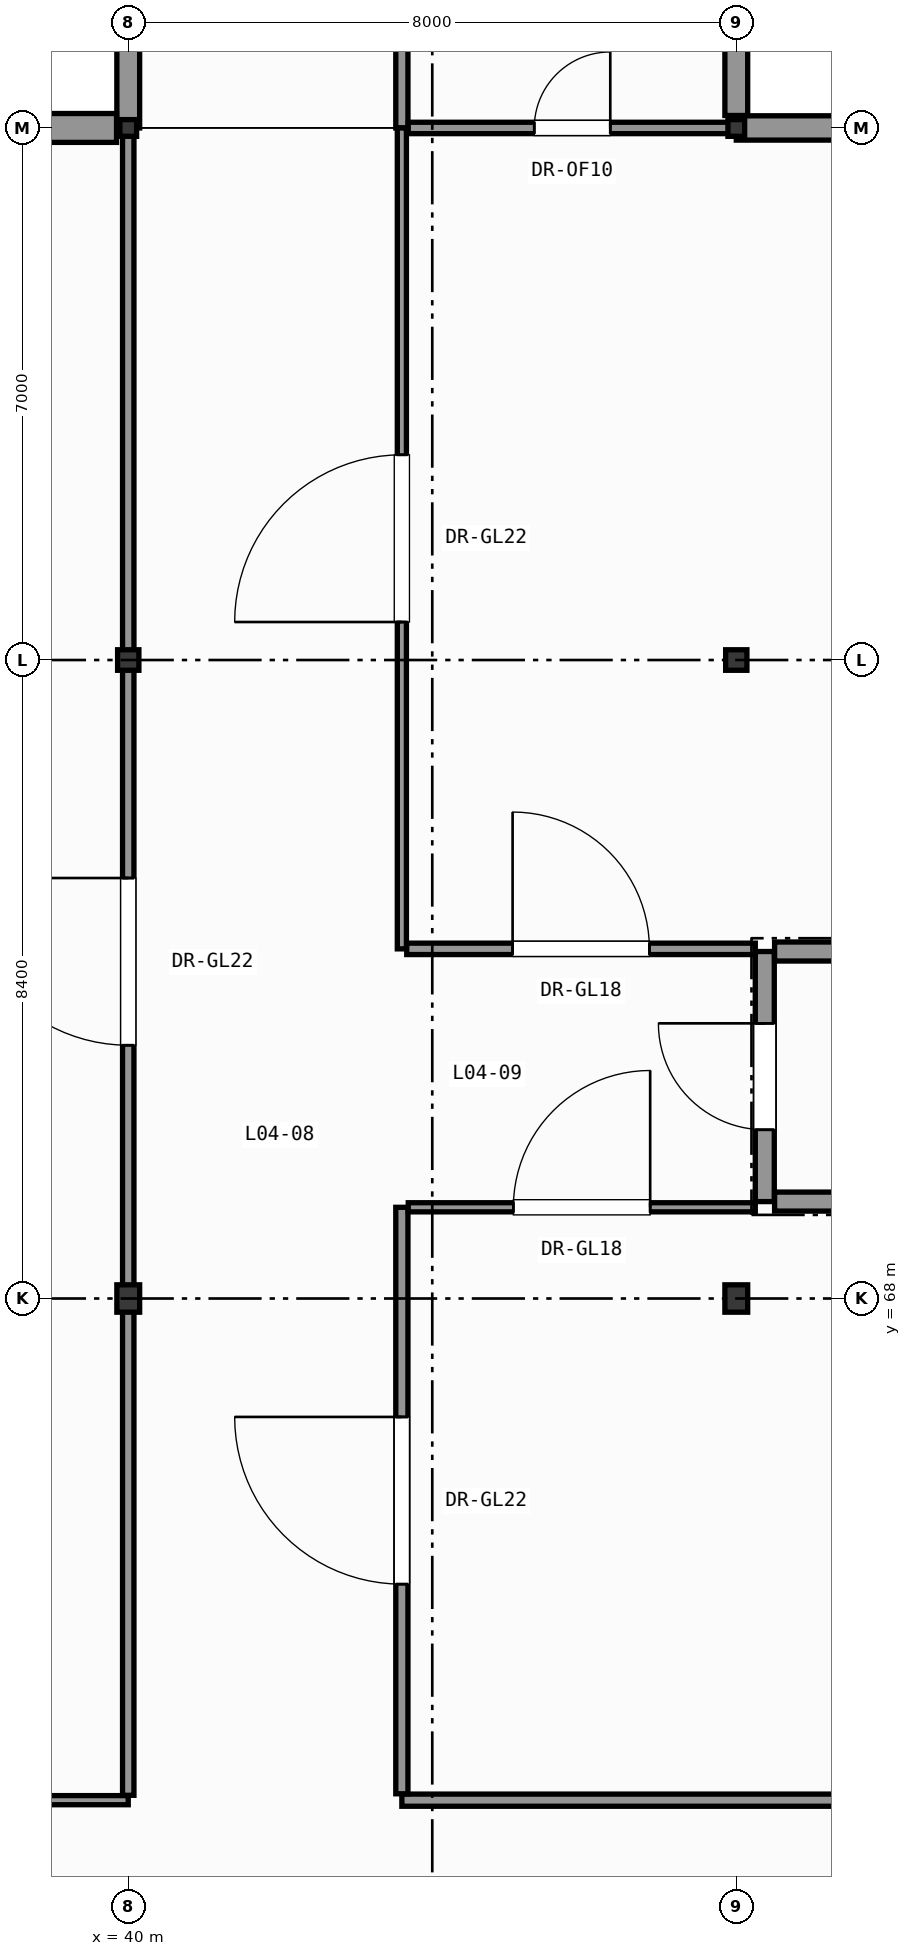
"""IFC4 building model, lengths in metres.
Left out: names, types, materials, properties, quantities, classifications, styles, units other than length and angle.
Written with IfcOpenShell. Run it as: python <this file> out.ifc"""

import sys

from ifc_helpers import new_model, si_unit, direction, frame, frame_2d, origin, origin_2d, place, context, subcontext, project, spatial, rectangle, hollow_rectangle, i_section, extrude, element, fill, save


model = new_model("IFC4")
c1 = context("Model", 3, precision=1e-05, world=origin(), true_north=direction((0.0, 1.0)))
c2 = subcontext(c1, "Body", "Model", "MODEL_VIEW")
j1 = project(units=[si_unit("LENGTHUNIT", "METRE"), si_unit("PLANEANGLEUNIT", "RADIAN")], contexts=[c1])
p1 = place(None, origin())
s1 = spatial("IfcSite", under=j1, at=p1, CompositionType="ELEMENT")
p2 = place(p1, origin())
s2 = spatial("IfcBuilding", under=s1, at=p2, CompositionType="ELEMENT")
p3 = place(p2, frame((0.0, 0.0, 18.0)))
s3 = spatial("IfcBuildingStorey", under=s2, at=p3, CompositionType="ELEMENT", Elevation=18.0)
p4 = place(p3, frame((40.0, 68.0, 0.0), z_axis=(0.0, 0.0, 1.0), x_axis=(1.0, 0.0, 0.0)))
e1 = element("IfcColumn", 1, at=p4, inside=s3, PredefinedType="COLUMN", context=c2, shape_type="SweptSolid", body=[
    extrude(i_section(OverallWidth=0.3, OverallDepth=0.36, WebThickness=0.012, FlangeThickness=0.022, FilletRadius=0.027, at=origin_2d()), origin(), (0.0, 0.0, 1.0), 4.2),
])
p5 = place(p3, frame((40.0, 76.4, 0.0), z_axis=(0.0, 0.0, 1.0), x_axis=(1.0, 0.0, 0.0)))
e2 = element("IfcColumn", 2, at=p5, inside=s3, PredefinedType="COLUMN", context=c2, shape_type="SweptSolid", body=[
    extrude(i_section(OverallWidth=0.28, OverallDepth=0.27, WebThickness=0.008, FlangeThickness=0.013, FilletRadius=0.024, at=origin_2d()), origin(), (0.0, 0.0, 1.0), 4.2),
])
p6 = place(p3, frame((40.0, 83.4, 0.0), z_axis=(0.0, 0.0, 1.0), x_axis=(1.0, 0.0, 0.0)))
e3 = element("IfcColumn", 3, at=p6, inside=s3, PredefinedType="COLUMN", context=c2, shape_type="SweptSolid", body=[
    extrude(hollow_rectangle(XDim=0.22, YDim=0.22, WallThickness=0.012, InnerFilletRadius=0.012, OuterFilletRadius=0.024, at=origin_2d()), origin(), (0.0, 0.0, 1.0), 4.2),
])
p7 = place(p3, frame((48.0, 68.0, 0.0), z_axis=(0.0, 0.0, 1.0), x_axis=(1.0, 0.0, 0.0)))
e4 = element("IfcColumn", 4, at=p7, inside=s3, PredefinedType="COLUMN", context=c2, shape_type="SweptSolid", body=[
    extrude(i_section(OverallWidth=0.3, OverallDepth=0.36, WebThickness=0.012, FlangeThickness=0.022, FilletRadius=0.027, at=origin_2d()), origin(), (0.0, 0.0, 1.0), 4.2),
])
p8 = place(p3, frame((48.0, 76.4, 0.0), z_axis=(0.0, 0.0, 1.0), x_axis=(1.0, 0.0, 0.0)))
e5 = element("IfcColumn", 5, at=p8, inside=s3, PredefinedType="COLUMN", context=c2, shape_type="SweptSolid", body=[
    extrude(i_section(OverallWidth=0.28, OverallDepth=0.27, WebThickness=0.008, FlangeThickness=0.013, FilletRadius=0.024, at=origin_2d()), origin(), (0.0, 0.0, 1.0), 4.2),
])
p9 = place(p3, frame((48.0, 83.4, 0.0), z_axis=(0.0, 0.0, 1.0), x_axis=(1.0, 0.0, 0.0)))
e6 = element("IfcColumn", 6, at=p9, inside=s3, PredefinedType="COLUMN", context=c2, shape_type="SweptSolid", body=[
    extrude(hollow_rectangle(XDim=0.22, YDim=0.22, WallThickness=0.012, InnerFilletRadius=0.012, OuterFilletRadius=0.024, at=origin_2d()), origin(), (0.0, 0.0, 1.0), 4.2),
])
p10 = place(p3, frame((48.0, 83.4, 0.0), z_axis=(0.0, 0.0, 1.0), x_axis=(1.0, 0.0, 0.0)))
e7 = element("IfcWall", 7, at=p10, inside=s3, PredefinedType="SOLIDWALL", context=c2, shape_type="SweptSolid", body=[
    extrude(rectangle(XDim=8.0, YDim=0.32, at=frame_2d((4.0, 0.0))), origin(), (0.0, 0.0, 1.0), 3.605),
])
p11 = place(p10, frame((1.517, 0.0, 0.95)))
e8 = element("IfcOpeningElement", 8, at=p11, cuts=e7, PredefinedType="OPENING", context=c2, shape_type="SweptSolid", body=[
    extrude(rectangle(XDim=2.3, YDim=2.26, at=frame_2d((1.15, 1.13))), frame((0.0, 0.17, 0.0), z_axis=(0.0, -1.0, 0.0), x_axis=(1.0, 0.0, 0.0)), (0.0, 0.0, 1.0), 0.34),
])
p12 = place(p10, frame((4.183, 0.0, 0.95)))
e9 = element("IfcOpeningElement", 9, at=p12, cuts=e7, PredefinedType="OPENING", context=c2, shape_type="SweptSolid", body=[
    extrude(rectangle(XDim=2.3, YDim=2.26, at=frame_2d((1.15, 1.13))), frame((0.0, 0.17, 0.0), z_axis=(0.0, -1.0, 0.0), x_axis=(1.0, 0.0, 0.0)), (0.0, 0.0, 1.0), 0.34),
])
p13 = place(p3, frame((48.0, 90.4, 0.0), z_axis=(0.0, 0.0, 1.0), x_axis=(0.0, -1.0, 0.0)))
e10 = element("IfcWall", 10, at=p13, inside=s3, PredefinedType="SOLIDWALL", context=c2, shape_type="SweptSolid", body=[
    extrude(rectangle(XDim=6.836, YDim=0.3, at=frame_2d((3.418, 0.0))), origin(), (0.0, 0.0, 1.0), 3.465),
])
p14 = place(p13, frame((1.504, 0.0, 0.95)))
e11 = element("IfcOpeningElement", 11, at=p14, cuts=e10, PredefinedType="OPENING", context=c2, shape_type="SweptSolid", body=[
    extrude(rectangle(XDim=1.55, YDim=2.1, at=frame_2d((0.775, 1.05))), frame((0.0, 0.16, 0.0), z_axis=(0.0, -1.0, 0.0), x_axis=(1.0, 0.0, 0.0)), (0.0, 0.0, 1.0), 0.32),
])
p15 = place(p13, frame((3.782, 0.0, 0.95)))
e12 = element("IfcOpeningElement", 12, at=p15, cuts=e10, PredefinedType="OPENING", context=c2, shape_type="SweptSolid", body=[
    extrude(rectangle(XDim=1.55, YDim=2.1, at=frame_2d((0.775, 1.05))), frame((0.0, 0.16, 0.0), z_axis=(0.0, -1.0, 0.0), x_axis=(1.0, 0.0, 0.0)), (0.0, 0.0, 1.0), 0.32),
])
p16 = place(p3, frame((40.0, 83.4, 0.0), z_axis=(0.0, 0.0, 1.0), x_axis=(0.0, 1.0, 0.0)))
e13 = element("IfcWall", 13, at=p16, inside=s3, PredefinedType="SOLIDWALL", context=c2, shape_type="SweptSolid", body=[
    extrude(rectangle(XDim=7.0, YDim=0.3, at=frame_2d((3.5, 0.0))), origin(), (0.0, 0.0, 1.0), 3.465),
])
p17 = place(p16, frame((1.558, 0.0, 0.95)))
e14 = element("IfcOpeningElement", 14, at=p17, cuts=e13, PredefinedType="OPENING", context=c2, shape_type="SweptSolid", body=[
    extrude(rectangle(XDim=1.55, YDim=2.1, at=frame_2d((0.775, 1.05))), frame((0.0, 0.16, 0.0), z_axis=(0.0, -1.0, 0.0), x_axis=(1.0, 0.0, 0.0)), (0.0, 0.0, 1.0), 0.32),
])
p18 = place(p16, frame((3.892, 0.0, 0.95)))
e15 = element("IfcOpeningElement", 15, at=p18, cuts=e13, PredefinedType="OPENING", context=c2, shape_type="SweptSolid", body=[
    extrude(rectangle(XDim=1.55, YDim=2.1, at=frame_2d((0.775, 1.05))), frame((0.0, 0.16, 0.0), z_axis=(0.0, -1.0, 0.0), x_axis=(1.0, 0.0, 0.0)), (0.0, 0.0, 1.0), 0.32),
])
p19 = place(p3, frame((32.0, 83.4, 0.0), z_axis=(0.0, 0.0, 1.0), x_axis=(1.0, 0.0, 0.0)))
e16 = element("IfcWall", 16, at=p19, inside=s3, PredefinedType="SOLIDWALL", context=c2, shape_type="SweptSolid", body=[
    extrude(rectangle(XDim=7.846, YDim=0.38, at=frame_2d((3.923, 0.0))), origin(), (0.0, 0.0, 1.0), 3.735),
])
p20 = place(p19, frame((1.64, 0.0, 0.95)))
e17 = element("IfcOpeningElement", 17, at=p20, cuts=e16, PredefinedType="OPENING", context=c2, shape_type="SweptSolid", body=[
    extrude(rectangle(XDim=1.95, YDim=2.38, at=frame_2d((0.975, 1.19))), frame((0.0, 0.2, 0.0), z_axis=(0.0, -1.0, 0.0), x_axis=(1.0, 0.0, 0.0)), (0.0, 0.0, 1.0), 0.4),
])
p21 = place(p19, frame((4.256, 0.0, 0.95)))
e18 = element("IfcOpeningElement", 18, at=p21, cuts=e16, PredefinedType="OPENING", context=c2, shape_type="SweptSolid", body=[
    extrude(rectangle(XDim=1.95, YDim=2.38, at=frame_2d((0.975, 1.19))), frame((0.0, 0.2, 0.0), z_axis=(0.0, -1.0, 0.0), x_axis=(1.0, 0.0, 0.0)), (0.0, 0.0, 1.0), 0.4),
])
p22 = place(p3, frame((48.375, 69.275, 0.0), z_axis=(0.0, 0.0, 1.0), x_axis=(0.0, 1.0, 0.0)))
e19 = element("IfcWall", 19, at=p22, inside=s3, PredefinedType="SHEAR", context=c2, shape_type="SweptSolid", body=[
    extrude(rectangle(XDim=3.29, YDim=0.25, at=frame_2d((1.645, 0.0))), origin(), (0.0, 0.0, 1.0), 3.98),
])
p23 = place(p22, frame((0.945, 0.0, 0.0)))
e20 = element("IfcOpeningElement", 20, at=p23, cuts=e19, PredefinedType="OPENING", context=c2, shape_type="SweptSolid", body=[
    extrude(rectangle(XDim=1.4, YDim=2.2, at=frame_2d((0.7, 1.1))), frame((0.0, 0.135, 0.0), z_axis=(0.0, -1.0, 0.0), x_axis=(1.0, 0.0, 0.0)), (0.0, 0.0, 1.0), 0.27),
])
for number, where, z_axis, x_axis in (
    (21, (48.504, 69.275, 0.0), (0.0, 0.0, 1.0), (1.0, 0.0, 0.0)),
    (22, (48.504, 72.565, 0.0), (0.0, 0.0, 1.0), (1.0, 0.0, 0.0)),
):
    element("IfcWall", number, at=place(p3, frame(where, z_axis=z_axis, x_axis=x_axis)), inside=s3, PredefinedType="SHEAR", context=c2, shape_type="SweptSolid", body=[
        extrude(rectangle(XDim=6.892, YDim=0.25, at=frame_2d((3.446, 0.0))), origin(), (0.0, 0.0, 1.0), 3.98),
    ])
p24 = place(p3, frame((43.6, 83.4, 0.0), z_axis=(0.0, 0.0, 1.0), x_axis=(0.0, 1.0, 0.0)))
e23 = element("IfcWall", 23, at=p24, inside=s3, PredefinedType="PARTITIONING", context=c2, shape_type="SweptSolid", body=[
    extrude(rectangle(XDim=29.736, YDim=0.16, at=frame_2d((14.868, 0.0))), origin(), (0.0, 0.0, 1.0), 3.98),
])
p25 = place(p24, frame((14.393, 0.0, 0.0)))
e24 = element("IfcOpeningElement", 24, at=p25, cuts=e23, PredefinedType="OPENING", context=c2, shape_type="SweptSolid", body=[
    extrude(rectangle(XDim=0.95, YDim=2.1, at=frame_2d((0.475, 1.05))), frame((0.0, 0.09, 0.0), z_axis=(0.0, -1.0, 0.0), x_axis=(1.0, 0.0, 0.0)), (0.0, 0.0, 1.0), 0.18),
])
p26 = place(p3, frame((43.684, 83.4, 0.0), z_axis=(0.0, 0.0, 1.0), x_axis=(1.0, 0.0, 0.0)))
e25 = element("IfcWall", 25, at=p26, inside=s3, PredefinedType="PARTITIONING", context=c2, shape_type="SweptSolid", body=[
    extrude(rectangle(XDim=4.316, YDim=0.15, at=frame_2d((2.158, 0.0))), origin(), (0.0, 0.0, 1.0), 3.665),
])
p27 = place(p26, frame((1.658, 0.0, 0.0)))
e26 = element("IfcOpeningElement", 26, at=p27, cuts=e25, PredefinedType="OPENING", context=c2, shape_type="SweptSolid", body=[
    extrude(rectangle(XDim=1.0, YDim=2.15, at=frame_2d((0.5, 1.075))), frame((0.0, 0.085, 0.0), z_axis=(0.0, -1.0, 0.0), x_axis=(1.0, 0.0, 0.0)), (0.0, 0.0, 1.0), 0.17),
])
p28 = place(p3, frame((14.564, 61.4, 0.0), z_axis=(0.0, 0.0, 1.0), x_axis=(1.0, 0.0, 0.0)))
e27 = element("IfcWall", 27, at=p28, inside=s3, PredefinedType="PARTITIONING", context=c2, shape_type="SweptSolid", body=[
    extrude(rectangle(XDim=25.436, YDim=0.12, at=frame_2d((12.718, 0.0))), origin(), (0.0, 0.0, 1.0), 3.98),
])
p29 = place(p28, frame((11.618, 0.0, 0.0)))
e28 = element("IfcOpeningElement", 28, at=p29, cuts=e27, PredefinedType="OPENING", context=c2, shape_type="SweptSolid", body=[
    extrude(rectangle(XDim=2.2, YDim=2.6, at=frame_2d((1.1, 1.3))), frame((0.0, 0.07, 0.0), z_axis=(0.0, -1.0, 0.0), x_axis=(1.0, 0.0, 0.0)), (0.0, 0.0, 1.0), 0.14),
])
p30 = place(p3, frame((43.6, 61.4, 0.0), z_axis=(0.0, 0.0, 1.0), x_axis=(1.0, 0.0, 0.0)))
e29 = element("IfcWall", 29, at=p30, inside=s3, PredefinedType="PARTITIONING", context=c2, shape_type="SweptSolid", body=[
    extrude(rectangle(XDim=26.4, YDim=0.16, at=frame_2d((13.2, 0.0))), origin(), (0.0, 0.0, 1.0), 3.98),
])
p31 = place(p30, frame((12.1, 0.0, 0.0)))
e30 = element("IfcOpeningElement", 30, at=p31, cuts=e29, PredefinedType="OPENING", context=c2, shape_type="SweptSolid", body=[
    extrude(rectangle(XDim=2.2, YDim=2.6, at=frame_2d((1.1, 1.3))), frame((0.0, 0.09, 0.0), z_axis=(0.0, -1.0, 0.0), x_axis=(1.0, 0.0, 0.0)), (0.0, 0.0, 1.0), 0.18),
])
p32 = place(p3, frame((40.0, 61.464, 0.0), z_axis=(0.0, 0.0, 1.0), x_axis=(0.0, 1.0, 0.0)))
e31 = element("IfcWall", 31, at=p32, inside=s3, PredefinedType="PARTITIONING", context=c2, shape_type="SweptSolid", body=[
    extrude(rectangle(XDim=21.936, YDim=0.15, at=frame_2d((10.968, 0.0))), origin(), (0.0, 0.0, 1.0), 3.465),
])
p33 = place(p32, frame((9.868, 0.0, 0.0)))
e32 = element("IfcOpeningElement", 32, at=p33, cuts=e31, PredefinedType="OPENING", context=c2, shape_type="SweptSolid", body=[
    extrude(rectangle(XDim=2.2, YDim=2.6, at=frame_2d((1.1, 1.3))), frame((0.0, 0.085, 0.0), z_axis=(0.0, -1.0, 0.0), x_axis=(1.0, 0.0, 0.0)), (0.0, 0.0, 1.0), 0.17),
])
p34 = place(p3, frame((43.6, 72.6, 0.0), z_axis=(0.0, 0.0, 1.0), x_axis=(0.0, 1.0, 0.0)))
e33 = element("IfcWall", 33, at=p34, inside=s3, PredefinedType="PARTITIONING", context=c2, shape_type="SweptSolid", body=[
    extrude(rectangle(XDim=10.8, YDim=0.12, at=frame_2d((5.4, 0.0))), origin(), (0.0, 0.0, 1.0), 3.98),
])
p35 = place(p34, frame((4.3, 0.0, 0.0)))
e34 = element("IfcOpeningElement", 34, at=p35, cuts=e33, PredefinedType="OPENING", context=c2, shape_type="SweptSolid", body=[
    extrude(rectangle(XDim=2.2, YDim=2.6, at=frame_2d((1.1, 1.3))), frame((0.0, 0.07, 0.0), z_axis=(0.0, -1.0, 0.0), x_axis=(1.0, 0.0, 0.0)), (0.0, 0.0, 1.0), 0.14),
])
p36 = place(p3, frame((43.6, 61.484, 0.0), z_axis=(0.0, 0.0, 1.0), x_axis=(0.0, 1.0, 0.0)))
e35 = element("IfcWall", 35, at=p36, inside=s3, PredefinedType="PARTITIONING", context=c2, shape_type="SweptSolid", body=[
    extrude(rectangle(XDim=7.716, YDim=0.16, at=frame_2d((3.858, 0.0))), origin(), (0.0, 0.0, 1.0), 3.98),
])
p37 = place(p36, frame((2.758, 0.0, 0.0)))
e36 = element("IfcOpeningElement", 36, at=p37, cuts=e35, PredefinedType="OPENING", context=c2, shape_type="SweptSolid", body=[
    extrude(rectangle(XDim=2.2, YDim=2.6, at=frame_2d((1.1, 1.3))), frame((0.0, 0.09, 0.0), z_axis=(0.0, -1.0, 0.0), x_axis=(1.0, 0.0, 0.0)), (0.0, 0.0, 1.0), 0.18),
])
p38 = place(p3, frame((43.664, 72.6, 0.0), z_axis=(0.0, 0.0, 1.0), x_axis=(1.0, 0.0, 0.0)))
e37 = element("IfcWall", 37, at=p38, inside=s3, PredefinedType="PARTITIONING", context=c2, shape_type="SweptSolid", body=[
    extrude(rectangle(XDim=4.586, YDim=0.15, at=frame_2d((2.293, 0.0))), origin(), (0.0, 0.0, 1.0), 3.98),
])
p39 = place(p38, frame((1.393, 0.0, 0.0)))
e38 = element("IfcOpeningElement", 38, at=p39, cuts=e37, PredefinedType="OPENING", context=c2, shape_type="SweptSolid", body=[
    extrude(rectangle(XDim=1.8, YDim=2.4, at=frame_2d((0.9, 1.2))), frame((0.0, 0.085, 0.0), z_axis=(0.0, -1.0, 0.0), x_axis=(1.0, 0.0, 0.0)), (0.0, 0.0, 1.0), 0.17),
])
p40 = place(p3, frame((43.684, 69.2, 0.0), z_axis=(0.0, 0.0, 1.0), x_axis=(1.0, 0.0, 0.0)))
e39 = element("IfcWall", 39, at=p40, inside=s3, PredefinedType="PARTITIONING", context=c2, shape_type="SweptSolid", body=[
    extrude(rectangle(XDim=4.566, YDim=0.12, at=frame_2d((2.283, 0.0))), origin(), (0.0, 0.0, 1.0), 3.98),
])
p41 = place(p40, frame((1.383, 0.0, 0.0)))
e40 = element("IfcOpeningElement", 40, at=p41, cuts=e39, PredefinedType="OPENING", context=c2, shape_type="SweptSolid", body=[
    extrude(rectangle(XDim=1.8, YDim=2.4, at=frame_2d((0.9, 1.2))), frame((0.0, 0.07, 0.0), z_axis=(0.0, -1.0, 0.0), x_axis=(1.0, 0.0, 0.0)), (0.0, 0.0, 1.0), 0.14),
])
p42 = place(p23, origin())
e41 = element("IfcDoor", 41, at=p42, inside=s3, OperationType="SINGLE_SWING_RIGHT", PredefinedType="DOOR", context=c2, shape_type="SweptSolid", body=[
    extrude(rectangle(XDim=1.4, YDim=2.2, at=frame_2d((0.7, 1.1))), frame((0.0, 0.025, 0.0), z_axis=(0.0, -1.0, 0.0), x_axis=(1.0, 0.0, 0.0)), (0.0, 0.0, 1.0), 0.05),
])
fill(e20, e41)
p43 = place(p27, origin())
e42 = element("IfcDoor", 42, at=p43, inside=s3, OperationType="SINGLE_SWING_RIGHT", PredefinedType="DOOR", context=c2, shape_type="SweptSolid", body=[
    extrude(rectangle(XDim=1.0, YDim=2.15, at=frame_2d((0.5, 1.075))), frame((0.0, 0.025, 0.0), z_axis=(0.0, -1.0, 0.0), x_axis=(1.0, 0.0, 0.0)), (0.0, 0.0, 1.0), 0.05),
])
fill(e26, e42)
p44 = place(p33, origin())
e43 = element("IfcDoor", 43, at=p44, inside=s3, OperationType="SINGLE_SWING_RIGHT", PredefinedType="DOOR", context=c2, shape_type="SweptSolid", body=[
    extrude(rectangle(XDim=2.2, YDim=2.6, at=frame_2d((1.1, 1.3))), frame((0.0, 0.025, 0.0), z_axis=(0.0, -1.0, 0.0), x_axis=(1.0, 0.0, 0.0)), (0.0, 0.0, 1.0), 0.05),
])
fill(e32, e43)
p45 = place(p35, origin())
e44 = element("IfcDoor", 44, at=p45, inside=s3, OperationType="SINGLE_SWING_LEFT", PredefinedType="DOOR", context=c2, shape_type="SweptSolid", body=[
    extrude(rectangle(XDim=2.2, YDim=2.6, at=frame_2d((1.1, 1.3))), frame((0.0, 0.025, 0.0), z_axis=(0.0, -1.0, 0.0), x_axis=(1.0, 0.0, 0.0)), (0.0, 0.0, 1.0), 0.05),
])
fill(e34, e44)
p46 = place(p37, origin())
e45 = element("IfcDoor", 45, at=p46, inside=s3, OperationType="SINGLE_SWING_RIGHT", PredefinedType="DOOR", context=c2, shape_type="SweptSolid", body=[
    extrude(rectangle(XDim=2.2, YDim=2.6, at=frame_2d((1.1, 1.3))), frame((0.0, 0.025, 0.0), z_axis=(0.0, -1.0, 0.0), x_axis=(1.0, 0.0, 0.0)), (0.0, 0.0, 1.0), 0.05),
])
fill(e36, e45)
p47 = place(p39, origin())
e46 = element("IfcDoor", 46, at=p47, inside=s3, OperationType="SINGLE_SWING_LEFT", PredefinedType="DOOR", context=c2, shape_type="SweptSolid", body=[
    extrude(rectangle(XDim=1.8, YDim=2.4, at=frame_2d((0.9, 1.2))), frame((0.0, 0.025, 0.0), z_axis=(0.0, -1.0, 0.0), x_axis=(1.0, 0.0, 0.0)), (0.0, 0.0, 1.0), 0.05),
])
fill(e38, e46)
p48 = place(p41, origin())
e47 = element("IfcDoor", 47, at=p48, inside=s3, OperationType="SINGLE_SWING_RIGHT", PredefinedType="DOOR", context=c2, shape_type="SweptSolid", body=[
    extrude(rectangle(XDim=1.8, YDim=2.4, at=frame_2d((0.9, 1.2))), frame((0.0, 0.025, 0.0), z_axis=(0.0, -1.0, 0.0), x_axis=(1.0, 0.0, 0.0)), (0.0, 0.0, 1.0), 0.05),
])
fill(e40, e47)
save(model, sys.argv[1])
